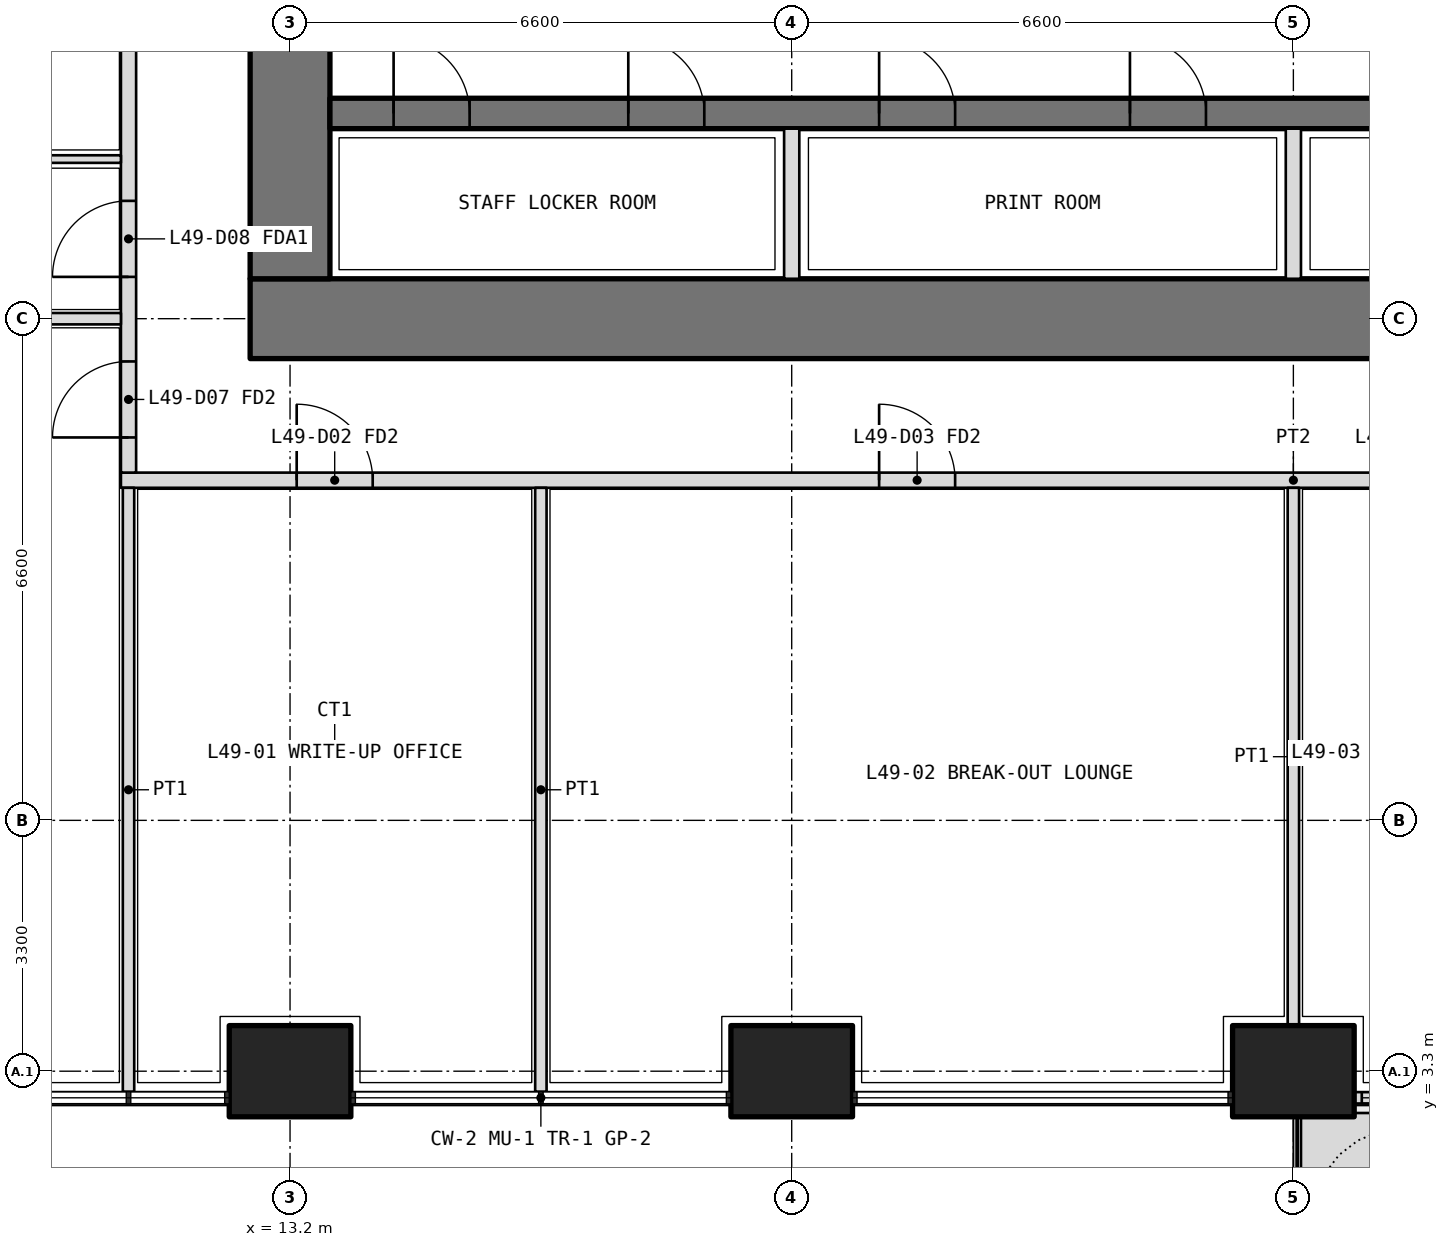
"""IFC4 building model, lengths in metres.
Left out: names, types, materials, properties, quantities, classifications, styles, units other than length and angle.
Written with IfcOpenShell. Run it as: python <this file> out.ifc"""

import sys

from ifc_helpers import new_model, si_unit, direction, frame, frame_2d, origin, origin_2d, place, context, subcontext, project, spatial, polyline, rectangle, outline, extrude, element, fill, save


model = new_model("IFC4")
c1 = context("Model", 3, precision=1e-05, world=origin(), true_north=direction((0.0, 1.0)))
c2 = subcontext(c1, "Body", "Model", "MODEL_VIEW")
j1 = project(units=[si_unit("LENGTHUNIT", "METRE"), si_unit("PLANEANGLEUNIT", "RADIAN")], contexts=[c1])
p1 = place(None, origin())
s1 = spatial("IfcSite", under=j1, at=p1, CompositionType="ELEMENT")
p2 = place(p1, origin())
s2 = spatial("IfcBuilding", under=s1, at=p2, CompositionType="ELEMENT")
p3 = place(p2, frame((0.0, 0.0, 214.5)))
s3 = spatial("IfcBuildingStorey", under=s2, at=p3, CompositionType="ELEMENT", Elevation=214.5)
for number, where, z_axis, x_axis in (
    (1, (13.2, 3.3, 0.0), (0.0, 0.0, 1.0), (1.0, 0.0, 0.0)),
    (2, (19.8, 3.3, 0.0), (0.0, 0.0, 1.0), (1.0, 0.0, 0.0)),
    (3, (26.4, 3.3, 0.0), (0.0, 0.0, 1.0), (1.0, 0.0, 0.0)),
):
    element("IfcColumn", number, at=place(p3, frame(where, z_axis=z_axis, x_axis=x_axis)), inside=s3, PredefinedType="COLUMN", context=c2, shape_type="SweptSolid", body=[
        extrude(rectangle(XDim=1.6, YDim=1.2, at=origin_2d()), origin(), (0.0, 0.0, 1.0), 4.2),
    ])
p4 = place(p3, origin())
e4 = element("IfcWall", 4, at=p4, inside=s3, PredefinedType="USERDEFINED", context=c2, shape_type="SweptSolid", body=[
    extrude(outline(polyline([(26.5, 1.75), (28.95, 1.75), (28.95, 2.75), (26.5, 2.75), (26.5, 1.75)]), holes=[polyline([(26.65, 1.9), (28.8, 1.9), (28.8, 2.6), (26.65, 2.6), (26.65, 1.9)])]), origin(), (0.0, 0.0, 1.0), 1.05),
])
p5 = place(p3, frame((27.2, 2.95, 0.0), z_axis=(0.0, 0.0, 1.0), x_axis=(1.0, 0.0, 0.0)))
e5 = element("IfcWall", 5, at=p5, inside=s3, PredefinedType="SOLIDWALL", context=c2, shape_type="SweptSolid", body=[
    extrude(rectangle(XDim=5.0, YDim=0.15, at=frame_2d((2.5, 0.0))), origin(), (0.0, 0.0, 1.0), 2.6),
])
p6 = place(p5, frame((2.75, 0.0, 0.0)))
e6 = element("IfcOpeningElement", 6, at=p6, cuts=e5, PredefinedType="OPENING", context=c2, shape_type="SweptSolid", body=[
    extrude(rectangle(XDim=1.0, YDim=2.4, at=frame_2d((0.5, 1.2))), frame((0.0, 0.085, 0.0), z_axis=(0.0, -1.0, 0.0), x_axis=(1.0, 0.0, 0.0)), (0.0, 0.0, 1.0), 0.17),
])
p7 = place(p5, frame((0.1, 0.0, 0.1)))
e7 = element("IfcOpeningElement", 7, at=p7, cuts=e5, PredefinedType="OPENING", context=c2, shape_type="SweptSolid", body=[
    extrude(rectangle(XDim=2.15, YDim=2.2, at=frame_2d((1.075, 1.1))), frame((0.0, 0.085, 0.0), z_axis=(0.0, -1.0, 0.0), x_axis=(1.0, 0.0, 0.0)), (0.0, 0.0, 1.0), 0.17),
])
p8 = place(p5, frame((3.85, 0.0, 0.1)))
e8 = element("IfcOpeningElement", 8, at=p8, cuts=e5, PredefinedType="OPENING", context=c2, shape_type="SweptSolid", body=[
    extrude(rectangle(XDim=1.05, YDim=2.2, at=frame_2d((0.525, 1.1))), frame((0.0, 0.085, 0.0), z_axis=(0.0, -1.0, 0.0), x_axis=(1.0, 0.0, 0.0)), (0.0, 0.0, 1.0), 0.17),
])
p9 = place(p3, frame((12.675, 13.2, 0.0), z_axis=(0.0, 0.0, 1.0), x_axis=(1.0, 0.0, 0.0)))
e9 = element("IfcWall", 9, at=p9, inside=s3, PredefinedType="SHEAR", context=c2, shape_type="SweptSolid", body=[
    extrude(rectangle(XDim=27.45, YDim=1.05, at=frame_2d((13.725, 0.0))), origin(), (0.0, 0.0, 1.0), 4.2),
])
p10 = place(p3, frame((13.2, 32.475, 0.0), z_axis=(0.0, 0.0, 1.0), x_axis=(0.0, -1.0, 0.0)))
e10 = element("IfcWall", 10, at=p10, inside=s3, PredefinedType="SHEAR", context=c2, shape_type="SweptSolid", body=[
    extrude(rectangle(XDim=18.75, YDim=1.05, at=frame_2d((9.375, 0.0))), origin(), (0.0, 0.0, 1.0), 4.2),
])
p11 = place(p10, frame((14.125, 0.0, 0.0)))
e11 = element("IfcOpeningElement", 11, at=p11, cuts=e10, PredefinedType="OPENING", context=c2, shape_type="SweptSolid", body=[
    extrude(rectangle(XDim=1.6, YDim=2.1, at=frame_2d((0.8, 1.05))), frame((0.0, 0.535, 0.0), z_axis=(0.0, -1.0, 0.0), x_axis=(1.0, 0.0, 0.0)), (0.0, 0.0, 1.0), 1.07),
])
p12 = place(p10, frame((3.325, 0.0, 0.0)))
e12 = element("IfcOpeningElement", 12, at=p12, cuts=e10, PredefinedType="OPENING", context=c2, shape_type="SweptSolid", body=[
    extrude(rectangle(XDim=1.6, YDim=2.1, at=frame_2d((0.8, 1.05))), frame((0.0, 0.535, 0.0), z_axis=(0.0, -1.0, 0.0), x_axis=(1.0, 0.0, 0.0)), (0.0, 0.0, 1.0), 1.07),
])
p13 = place(p3, frame((13.725, 15.9, 0.0), z_axis=(0.0, 0.0, 1.0), x_axis=(1.0, 0.0, 0.0)))
e13 = element("IfcWall", 13, at=p13, inside=s3, PredefinedType="SHEAR", context=c2, shape_type="SweptSolid", body=[
    extrude(rectangle(XDim=25.35, YDim=0.4, at=frame_2d((12.675, 0.0))), origin(), (0.0, 0.0, 1.0), 4.2),
])
p14 = place(p13, frame((0.837, 0.0, 0.0)))
e14 = element("IfcOpeningElement", 14, at=p14, cuts=e13, PredefinedType="OPENING", context=c2, shape_type="SweptSolid", body=[
    extrude(rectangle(XDim=1.0, YDim=2.1, at=frame_2d((0.5, 1.05))), frame((0.0, 0.21, 0.0), z_axis=(0.0, -1.0, 0.0), x_axis=(1.0, 0.0, 0.0)), (0.0, 0.0, 1.0), 0.42),
])
p15 = place(p13, frame((3.925, 0.0, 0.0)))
e15 = element("IfcOpeningElement", 15, at=p15, cuts=e13, PredefinedType="OPENING", context=c2, shape_type="SweptSolid", body=[
    extrude(rectangle(XDim=1.0, YDim=2.1, at=frame_2d((0.5, 1.05))), frame((0.0, 0.21, 0.0), z_axis=(0.0, -1.0, 0.0), x_axis=(1.0, 0.0, 0.0)), (0.0, 0.0, 1.0), 0.42),
])
p16 = place(p13, frame((7.225, 0.0, 0.0)))
e16 = element("IfcOpeningElement", 16, at=p16, cuts=e13, PredefinedType="OPENING", context=c2, shape_type="SweptSolid", body=[
    extrude(rectangle(XDim=1.0, YDim=2.1, at=frame_2d((0.5, 1.05))), frame((0.0, 0.21, 0.0), z_axis=(0.0, -1.0, 0.0), x_axis=(1.0, 0.0, 0.0)), (0.0, 0.0, 1.0), 0.42),
])
p17 = place(p13, frame((10.525, 0.0, 0.0)))
e17 = element("IfcOpeningElement", 17, at=p17, cuts=e13, PredefinedType="OPENING", context=c2, shape_type="SweptSolid", body=[
    extrude(rectangle(XDim=1.0, YDim=2.1, at=frame_2d((0.5, 1.05))), frame((0.0, 0.21, 0.0), z_axis=(0.0, -1.0, 0.0), x_axis=(1.0, 0.0, 0.0)), (0.0, 0.0, 1.0), 0.42),
])
p18 = place(p13, frame((13.825, 0.0, 0.0)))
e18 = element("IfcOpeningElement", 18, at=p18, cuts=e13, PredefinedType="OPENING", context=c2, shape_type="SweptSolid", body=[
    extrude(rectangle(XDim=1.0, YDim=2.1, at=frame_2d((0.5, 1.05))), frame((0.0, 0.21, 0.0), z_axis=(0.0, -1.0, 0.0), x_axis=(1.0, 0.0, 0.0)), (0.0, 0.0, 1.0), 0.42),
])
p19 = place(p13, frame((17.125, 0.0, 0.0)))
e19 = element("IfcOpeningElement", 19, at=p19, cuts=e13, PredefinedType="OPENING", context=c2, shape_type="SweptSolid", body=[
    extrude(rectangle(XDim=1.0, YDim=2.1, at=frame_2d((0.5, 1.05))), frame((0.0, 0.21, 0.0), z_axis=(0.0, -1.0, 0.0), x_axis=(1.0, 0.0, 0.0)), (0.0, 0.0, 1.0), 0.42),
])
p20 = place(p13, frame((20.425, 0.0, 0.0)))
e20 = element("IfcOpeningElement", 20, at=p20, cuts=e13, PredefinedType="OPENING", context=c2, shape_type="SweptSolid", body=[
    extrude(rectangle(XDim=1.0, YDim=2.1, at=frame_2d((0.5, 1.05))), frame((0.0, 0.21, 0.0), z_axis=(0.0, -1.0, 0.0), x_axis=(1.0, 0.0, 0.0)), (0.0, 0.0, 1.0), 0.42),
])
p21 = place(p13, frame((23.512, 0.0, 0.0)))
e21 = element("IfcOpeningElement", 21, at=p21, cuts=e13, PredefinedType="OPENING", context=c2, shape_type="SweptSolid", body=[
    extrude(rectangle(XDim=1.0, YDim=2.1, at=frame_2d((0.5, 1.05))), frame((0.0, 0.21, 0.0), z_axis=(0.0, -1.0, 0.0), x_axis=(1.0, 0.0, 0.0)), (0.0, 0.0, 1.0), 0.42),
])
for number, where, z_axis, x_axis in (
    (22, (19.8, 13.725, 0.0), (0.0, 0.0, 1.0), (0.0, 1.0, 0.0)),
    (23, (26.4, 13.725, 0.0), (0.0, 0.0, 1.0), (0.0, 1.0, 0.0)),
):
    element("IfcWall", number, at=place(p3, frame(where, z_axis=z_axis, x_axis=x_axis)), inside=s3, PredefinedType="PARTITIONING", context=c2, shape_type="SweptSolid", body=[
        extrude(rectangle(XDim=1.975, YDim=0.2, at=frame_2d((0.987, 0.0))), origin(), (0.0, 0.0, 1.0), 4.2),
    ])
p22 = place(p3, frame((10.975, 11.075, 0.0), z_axis=(0.0, 0.0, 1.0), x_axis=(1.0, 0.0, 0.0)))
e24 = element("IfcWall", 24, at=p22, inside=s3, PredefinedType="PARTITIONING", context=c2, shape_type="SweptSolid", body=[
    extrude(rectangle(XDim=30.85, YDim=0.2, at=frame_2d((15.425, 0.0))), origin(), (0.0, 0.0, 1.0), 2.85),
])
p23 = place(p22, frame((2.312, 0.0, 0.0)))
e25 = element("IfcOpeningElement", 25, at=p23, cuts=e24, PredefinedType="OPENING", context=c2, shape_type="SweptSolid", body=[
    extrude(rectangle(XDim=1.0, YDim=2.1, at=frame_2d((0.5, 1.05))), frame((0.0, 0.11, 0.0), z_axis=(0.0, -1.0, 0.0), x_axis=(1.0, 0.0, 0.0)), (0.0, 0.0, 1.0), 0.22),
])
p24 = place(p22, frame((9.975, 0.0, 0.0)))
e26 = element("IfcOpeningElement", 26, at=p24, cuts=e24, PredefinedType="OPENING", context=c2, shape_type="SweptSolid", body=[
    extrude(rectangle(XDim=1.0, YDim=2.1, at=frame_2d((0.5, 1.05))), frame((0.0, 0.11, 0.0), z_axis=(0.0, -1.0, 0.0), x_axis=(1.0, 0.0, 0.0)), (0.0, 0.0, 1.0), 0.22),
])
p25 = place(p22, frame((16.575, 0.0, 0.0)))
e27 = element("IfcOpeningElement", 27, at=p25, cuts=e24, PredefinedType="OPENING", context=c2, shape_type="SweptSolid", body=[
    extrude(rectangle(XDim=1.0, YDim=2.1, at=frame_2d((0.5, 1.05))), frame((0.0, 0.11, 0.0), z_axis=(0.0, -1.0, 0.0), x_axis=(1.0, 0.0, 0.0)), (0.0, 0.0, 1.0), 0.22),
])
p26 = place(p22, frame((23.175, 0.0, 0.0)))
e28 = element("IfcOpeningElement", 28, at=p26, cuts=e24, PredefinedType="OPENING", context=c2, shape_type="SweptSolid", body=[
    extrude(rectangle(XDim=1.0, YDim=2.1, at=frame_2d((0.5, 1.05))), frame((0.0, 0.11, 0.0), z_axis=(0.0, -1.0, 0.0), x_axis=(1.0, 0.0, 0.0)), (0.0, 0.0, 1.0), 0.22),
])
p27 = place(p22, frame((29.188, 0.0, 0.0)))
e29 = element("IfcOpeningElement", 29, at=p27, cuts=e24, PredefinedType="OPENING", context=c2, shape_type="SweptSolid", body=[
    extrude(rectangle(XDim=1.0, YDim=2.1, at=frame_2d((0.5, 1.05))), frame((0.0, 0.11, 0.0), z_axis=(0.0, -1.0, 0.0), x_axis=(1.0, 0.0, 0.0)), (0.0, 0.0, 1.0), 0.22),
])
p28 = place(p3, frame((11.075, 11.175, 0.0), z_axis=(0.0, 0.0, 1.0), x_axis=(0.0, 1.0, 0.0)))
e30 = element("IfcWall", 30, at=p28, inside=s3, PredefinedType="PARTITIONING", context=c2, shape_type="SweptSolid", body=[
    extrude(rectangle(XDim=23.85, YDim=0.2, at=frame_2d((11.925, 0.0))), origin(), (0.0, 0.0, 1.0), 2.85),
])
p29 = place(p28, frame((0.462, 0.0, 0.0)))
e31 = element("IfcOpeningElement", 31, at=p29, cuts=e30, PredefinedType="OPENING", context=c2, shape_type="SweptSolid", body=[
    extrude(rectangle(XDim=1.0, YDim=2.1, at=frame_2d((0.5, 1.05))), frame((0.0, 0.11, 0.0), z_axis=(0.0, -1.0, 0.0), x_axis=(1.0, 0.0, 0.0)), (0.0, 0.0, 1.0), 0.22),
])
p30 = place(p28, frame((2.575, 0.0, 0.0)))
e32 = element("IfcOpeningElement", 32, at=p30, cuts=e30, PredefinedType="OPENING", context=c2, shape_type="SweptSolid", body=[
    extrude(rectangle(XDim=1.0, YDim=2.1, at=frame_2d((0.5, 1.05))), frame((0.0, 0.11, 0.0), z_axis=(0.0, -1.0, 0.0), x_axis=(1.0, 0.0, 0.0)), (0.0, 0.0, 1.0), 0.22),
])
p31 = place(p28, frame((5.625, 0.0, 0.0)))
e33 = element("IfcOpeningElement", 33, at=p31, cuts=e30, PredefinedType="OPENING", context=c2, shape_type="SweptSolid", body=[
    extrude(rectangle(XDim=0.9, YDim=2.1, at=frame_2d((0.45, 1.05))), frame((0.0, 0.11, 0.0), z_axis=(0.0, -1.0, 0.0), x_axis=(1.0, 0.0, 0.0)), (0.0, 0.0, 1.0), 0.22),
])
p32 = place(p28, frame((9.425, 0.0, 0.0)))
e34 = element("IfcOpeningElement", 34, at=p32, cuts=e30, PredefinedType="OPENING", context=c2, shape_type="SweptSolid", body=[
    extrude(rectangle(XDim=0.9, YDim=2.1, at=frame_2d((0.45, 1.05))), frame((0.0, 0.11, 0.0), z_axis=(0.0, -1.0, 0.0), x_axis=(1.0, 0.0, 0.0)), (0.0, 0.0, 1.0), 0.22),
])
p33 = place(p28, frame((12.975, 0.0, 0.0)))
e35 = element("IfcOpeningElement", 35, at=p33, cuts=e30, PredefinedType="OPENING", context=c2, shape_type="SweptSolid", body=[
    extrude(rectangle(XDim=1.0, YDim=2.1, at=frame_2d((0.5, 1.05))), frame((0.0, 0.11, 0.0), z_axis=(0.0, -1.0, 0.0), x_axis=(1.0, 0.0, 0.0)), (0.0, 0.0, 1.0), 0.22),
])
p34 = place(p28, frame((16.275, 0.0, 0.0)))
e36 = element("IfcOpeningElement", 36, at=p34, cuts=e30, PredefinedType="OPENING", context=c2, shape_type="SweptSolid", body=[
    extrude(rectangle(XDim=1.2, YDim=2.1, at=frame_2d((0.6, 1.05))), frame((0.0, 0.11, 0.0), z_axis=(0.0, -1.0, 0.0), x_axis=(1.0, 0.0, 0.0)), (0.0, 0.0, 1.0), 0.22),
])
p35 = place(p28, frame((19.575, 0.0, 0.0)))
e37 = element("IfcOpeningElement", 37, at=p35, cuts=e30, PredefinedType="OPENING", context=c2, shape_type="SweptSolid", body=[
    extrude(rectangle(XDim=1.2, YDim=2.1, at=frame_2d((0.6, 1.05))), frame((0.0, 0.11, 0.0), z_axis=(0.0, -1.0, 0.0), x_axis=(1.0, 0.0, 0.0)), (0.0, 0.0, 1.0), 0.22),
])
p36 = place(p28, frame((22.288, 0.0, 0.0)))
e38 = element("IfcOpeningElement", 38, at=p36, cuts=e30, PredefinedType="OPENING", context=c2, shape_type="SweptSolid", body=[
    extrude(rectangle(XDim=1.2, YDim=2.1, at=frame_2d((0.6, 1.05))), frame((0.0, 0.11, 0.0), z_axis=(0.0, -1.0, 0.0), x_axis=(1.0, 0.0, 0.0)), (0.0, 0.0, 1.0), 0.22),
])
for number, where, z_axis, x_axis in (
    (39, (11.075, 3.03, 0.0), (0.0, 0.0, 1.0), (0.0, 1.0, 0.0)),
    (40, (16.5, 3.03, 0.0), (0.0, 0.0, 1.0), (0.0, 1.0, 0.0)),
):
    element("IfcWall", number, at=place(p3, frame(where, z_axis=z_axis, x_axis=x_axis)), inside=s3, PredefinedType="PARTITIONING", context=c2, shape_type="SweptSolid", body=[
        extrude(rectangle(XDim=7.945, YDim=0.15, at=frame_2d((3.973, 0.0))), origin(), (0.0, 0.0, 1.0), 2.6),
    ])
p37 = place(p3, frame((26.4, 3.9, 0.0), z_axis=(0.0, 0.0, 1.0), x_axis=(0.0, 1.0, 0.0)))
e41 = element("IfcWall", 41, at=p37, inside=s3, PredefinedType="PARTITIONING", context=c2, shape_type="SweptSolid", body=[
    extrude(rectangle(XDim=7.075, YDim=0.15, at=frame_2d((3.538, 0.0))), origin(), (0.0, 0.0, 1.0), 2.85),
])
p38 = place(p3, frame((3.03, 15.3, 0.0), z_axis=(0.0, 0.0, 1.0), x_axis=(1.0, 0.0, 0.0)))
e42 = element("IfcWall", 42, at=p38, inside=s3, PredefinedType="PARTITIONING", context=c2, shape_type="SweptSolid", body=[
    extrude(rectangle(XDim=7.945, YDim=0.1, at=frame_2d((3.973, 0.0))), origin(), (0.0, 0.0, 1.0), 2.6),
])
p39 = place(p3, frame((7.2, 13.2, 0.0), z_axis=(0.0, 0.0, 1.0), x_axis=(1.0, 0.0, 0.0)))
e43 = element("IfcWall", 43, at=p39, inside=s3, PredefinedType="PARTITIONING", context=c2, shape_type="SweptSolid", body=[
    extrude(rectangle(XDim=3.775, YDim=0.15, at=frame_2d((1.888, 0.0))), origin(), (0.0, 0.0, 1.0), 2.85),
])
p40 = place(p7, origin())
e44 = element("IfcWindow", 44, at=p40, inside=s3, PartitioningType="SINGLE_PANEL", PredefinedType="WINDOW", context=c2, shape_type="SweptSolid", body=[
    extrude(rectangle(XDim=2.15, YDim=2.2, at=frame_2d((1.075, 1.1))), frame((0.0, 0.03, 0.0), z_axis=(0.0, -1.0, 0.0), x_axis=(1.0, 0.0, 0.0)), (0.0, 0.0, 1.0), 0.06),
])
fill(e7, e44)
p41 = place(p23, origin())
e45 = element("IfcDoor", 45, at=p41, inside=s3, OperationType="SINGLE_SWING_LEFT", PredefinedType="DOOR", context=c2, shape_type="SweptSolid", body=[
    extrude(rectangle(XDim=1.0, YDim=2.1, at=frame_2d((0.5, 1.05))), frame((0.0, 0.025, 0.0), z_axis=(0.0, -1.0, 0.0), x_axis=(1.0, 0.0, 0.0)), (0.0, 0.0, 1.0), 0.05),
])
fill(e25, e45)
p42 = place(p24, origin())
e46 = element("IfcDoor", 46, at=p42, inside=s3, OperationType="SINGLE_SWING_LEFT", PredefinedType="DOOR", context=c2, shape_type="SweptSolid", body=[
    extrude(rectangle(XDim=1.0, YDim=2.1, at=frame_2d((0.5, 1.05))), frame((0.0, 0.025, 0.0), z_axis=(0.0, -1.0, 0.0), x_axis=(1.0, 0.0, 0.0)), (0.0, 0.0, 1.0), 0.05),
])
fill(e26, e46)
p43 = place(p29, origin())
e47 = element("IfcDoor", 47, at=p43, inside=s3, OperationType="SINGLE_SWING_LEFT", PredefinedType="DOOR", context=c2, shape_type="SweptSolid", body=[
    extrude(rectangle(XDim=1.0, YDim=2.1, at=frame_2d((0.5, 1.05))), frame((0.0, 0.025, 0.0), z_axis=(0.0, -1.0, 0.0), x_axis=(1.0, 0.0, 0.0)), (0.0, 0.0, 1.0), 0.05),
])
fill(e31, e47)
p44 = place(p30, origin())
e48 = element("IfcDoor", 48, at=p44, inside=s3, OperationType="SINGLE_SWING_LEFT", PredefinedType="DOOR", context=c2, shape_type="SweptSolid", body=[
    extrude(rectangle(XDim=1.0, YDim=2.1, at=frame_2d((0.5, 1.05))), frame((0.0, 0.025, 0.0), z_axis=(0.0, -1.0, 0.0), x_axis=(1.0, 0.0, 0.0)), (0.0, 0.0, 1.0), 0.05),
])
fill(e32, e48)
p45 = place(p14, origin())
e49 = element("IfcDoor", 49, at=p45, inside=s3, OperationType="SINGLE_SWING_LEFT", PredefinedType="DOOR", context=c2, shape_type="SweptSolid", body=[
    extrude(rectangle(XDim=1.0, YDim=2.1, at=frame_2d((0.5, 1.05))), frame((0.0, 0.025, 0.0), z_axis=(0.0, -1.0, 0.0), x_axis=(1.0, 0.0, 0.0)), (0.0, 0.0, 1.0), 0.05),
])
fill(e14, e49)
p46 = place(p15, origin())
e50 = element("IfcDoor", 50, at=p46, inside=s3, OperationType="SINGLE_SWING_LEFT", PredefinedType="DOOR", context=c2, shape_type="SweptSolid", body=[
    extrude(rectangle(XDim=1.0, YDim=2.1, at=frame_2d((0.5, 1.05))), frame((0.0, 0.025, 0.0), z_axis=(0.0, -1.0, 0.0), x_axis=(1.0, 0.0, 0.0)), (0.0, 0.0, 1.0), 0.05),
])
fill(e15, e50)
p47 = place(p16, origin())
e51 = element("IfcDoor", 51, at=p47, inside=s3, OperationType="SINGLE_SWING_LEFT", PredefinedType="DOOR", context=c2, shape_type="SweptSolid", body=[
    extrude(rectangle(XDim=1.0, YDim=2.1, at=frame_2d((0.5, 1.05))), frame((0.0, 0.025, 0.0), z_axis=(0.0, -1.0, 0.0), x_axis=(1.0, 0.0, 0.0)), (0.0, 0.0, 1.0), 0.05),
])
fill(e16, e51)
p48 = place(p17, origin())
e52 = element("IfcDoor", 52, at=p48, inside=s3, OperationType="SINGLE_SWING_LEFT", PredefinedType="DOOR", context=c2, shape_type="SweptSolid", body=[
    extrude(rectangle(XDim=1.0, YDim=2.1, at=frame_2d((0.5, 1.05))), frame((0.0, 0.025, 0.0), z_axis=(0.0, -1.0, 0.0), x_axis=(1.0, 0.0, 0.0)), (0.0, 0.0, 1.0), 0.05),
])
fill(e17, e52)
save(model, sys.argv[1])
